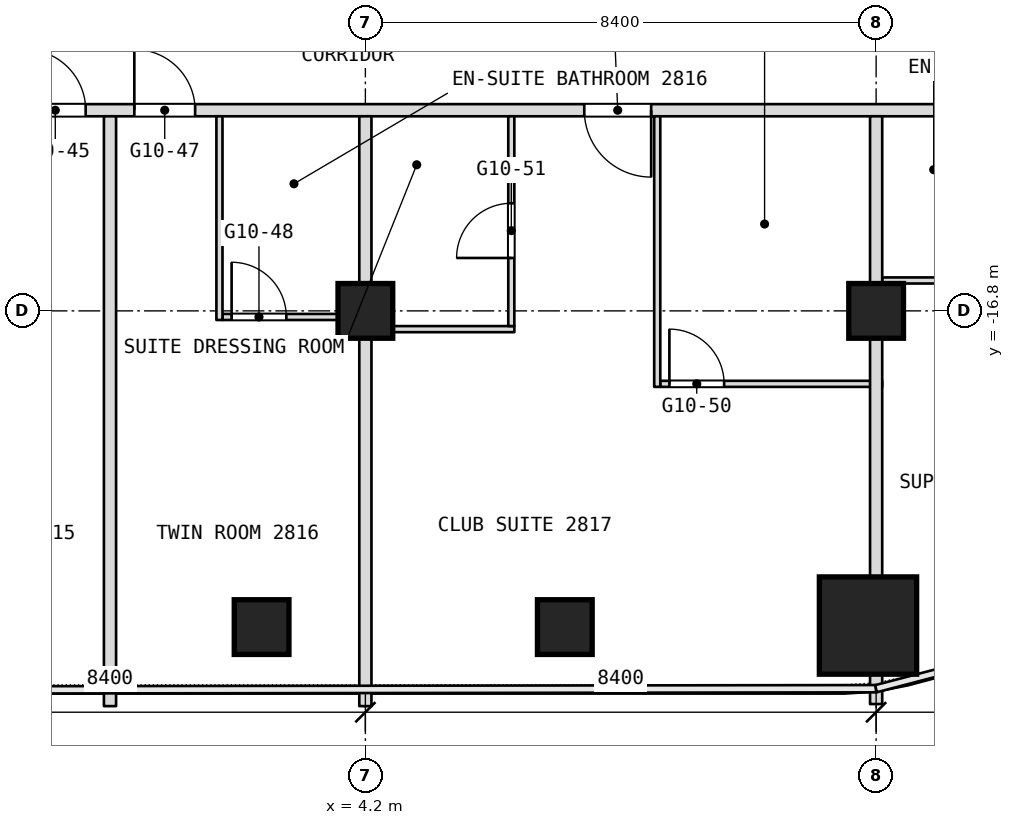
"""IFC4 building model, lengths in metres.
Left out: names, types, materials, properties, quantities, classifications, styles, units other than length and angle.
Written with IfcOpenShell. Run it as: python <this file> out.ifc"""

import sys

from ifc_helpers import new_model, si_unit, direction, frame, frame_2d, origin, origin_2d, place, context, subcontext, project, spatial, rectangle, extrude, element, fill, save


model = new_model("IFC4")
c1 = context("Model", 3, precision=1e-05, world=origin(), true_north=direction((0.0, 1.0)))
c2 = subcontext(c1, "Body", "Model", "MODEL_VIEW")
j1 = project(units=[si_unit("LENGTHUNIT", "METRE"), si_unit("PLANEANGLEUNIT", "RADIAN")], contexts=[c1])
p1 = place(None, origin())
s1 = spatial("IfcSite", under=j1, at=p1, CompositionType="ELEMENT")
p2 = place(p1, origin())
s2 = spatial("IfcBuilding", under=s1, at=p2, CompositionType="ELEMENT")
p3 = place(p2, frame((0.0, 0.0, 126.5)))
s3 = spatial("IfcBuildingStorey", under=s2, at=p3, CompositionType="ELEMENT", Elevation=126.5)
p4 = place(p3, frame((12.466, -21.975, 0.0), z_axis=(0.0, 0.0, 1.0), x_axis=(1.0, 0.0, 0.0)))
e1 = element("IfcColumn", 1, at=p4, inside=s3, PredefinedType="COLUMN", context=c2, shape_type="SweptSolid", body=[
    extrude(rectangle(XDim=1.6, YDim=1.6, at=origin_2d()), origin(), (0.0, 0.0, 1.0), 3.6),
])
for number, where, z_axis, x_axis in (
    (2, (4.2, -16.8, 0.0), (0.0, 0.0, 1.0), (1.0, 0.0, 0.0)),
    (3, (12.6, -16.8, 0.0), (0.0, 0.0, 1.0), (1.0, 0.0, 0.0)),
    (4, (7.48, -22.0, 0.0), (0.0, 0.0, 1.0), (1.0, 0.0, 0.0)),
    (5, (2.493, -22.0, 0.0), (0.0, 0.0, 1.0), (1.0, 0.0, 0.0)),
):
    element("IfcColumn", number, at=place(p3, frame(where, z_axis=z_axis, x_axis=x_axis)), inside=s3, PredefinedType="COLUMN", context=c2, shape_type="SweptSolid", body=[
        extrude(rectangle(XDim=0.9, YDim=0.9, at=origin_2d()), origin(), (0.0, 0.0, 1.0), 3.6),
    ])
p5 = place(p3, frame((9.05, -18.0, 0.0), z_axis=(0.0, 0.0, 1.0), x_axis=(1.0, 0.0, 0.0)))
e6 = element("IfcWall", 6, at=p5, inside=s3, PredefinedType="PARTITIONING", context=c2, shape_type="SweptSolid", body=[
    extrude(rectangle(XDim=3.65, YDim=0.1, at=frame_2d((1.825, 0.0))), origin(), (0.0, 0.0, 1.0), 3.34),
])
p6 = place(p5, frame((0.15, 0.0, 0.0)))
e7 = element("IfcOpeningElement", 7, at=p6, cuts=e6, PredefinedType="OPENING", context=c2, shape_type="SweptSolid", body=[
    extrude(rectangle(XDim=0.9, YDim=2.1, at=frame_2d((0.45, 1.05))), frame((0.0, 0.05, 0.0), z_axis=(0.0, -1.0, 0.0), x_axis=(1.0, 0.0, 0.0)), (0.0, 0.0, 1.0), 0.1),
])
p7 = place(p3, frame((4.3, -17.1, 0.0), z_axis=(0.0, 0.0, 1.0), x_axis=(1.0, 0.0, 0.0)))
e8 = element("IfcWall", 8, at=p7, inside=s3, PredefinedType="PARTITIONING", context=c2, shape_type="SweptSolid", body=[
    extrude(rectangle(XDim=2.35, YDim=0.1, at=frame_2d((1.175, 0.0))), origin(), (0.0, 0.0, 1.0), 3.34),
])
p8 = place(p3, frame((1.85, -16.9, 0.0), z_axis=(0.0, 0.0, 1.0), x_axis=(1.0, 0.0, 0.0)))
e9 = element("IfcWall", 9, at=p8, inside=s3, PredefinedType="PARTITIONING", context=c2, shape_type="SweptSolid", body=[
    extrude(rectangle(XDim=2.45, YDim=0.1, at=frame_2d((1.225, 0.0))), origin(), (0.0, 0.0, 1.0), 2.89),
])
p9 = place(p8, frame((0.15, 0.0, 0.0)))
e10 = element("IfcOpeningElement", 10, at=p9, cuts=e9, PredefinedType="OPENING", context=c2, shape_type="SweptSolid", body=[
    extrude(rectangle(XDim=0.9, YDim=2.1, at=frame_2d((0.45, 1.05))), frame((0.0, 0.05, 0.0), z_axis=(0.0, -1.0, 0.0), x_axis=(1.0, 0.0, 0.0)), (0.0, 0.0, 1.0), 0.1),
])
p10 = place(p3, frame((12.7, -16.3, 0.0), z_axis=(0.0, 0.0, 1.0), x_axis=(1.0, 0.0, 0.0)))
e11 = element("IfcWall", 11, at=p10, inside=s3, PredefinedType="PARTITIONING", context=c2, shape_type="SweptSolid", body=[
    extrude(rectangle(XDim=2.35, YDim=0.1, at=frame_2d((1.175, 0.0))), origin(), (0.0, 0.0, 1.0), 3.34),
])
p11 = place(p10, frame((1.3, 0.0, 0.0)))
e12 = element("IfcOpeningElement", 12, at=p11, cuts=e11, PredefinedType="OPENING", context=c2, shape_type="SweptSolid", body=[
    extrude(rectangle(XDim=0.9, YDim=2.1, at=frame_2d((0.45, 1.05))), frame((0.0, 0.05, 0.0), z_axis=(0.0, -1.0, 0.0), x_axis=(1.0, 0.0, 0.0)), (0.0, 0.0, 1.0), 0.1),
])
p12 = place(p3, frame((-3.2, -13.5, 0.0), z_axis=(0.0, 0.0, 1.0), x_axis=(1.0, 0.0, 0.0)))
e13 = element("IfcWall", 13, at=p12, inside=s3, PredefinedType="PARTITIONING", context=c2, shape_type="SweptSolid", body=[
    extrude(rectangle(XDim=19.9, YDim=0.2, at=frame_2d((9.95, 0.0))), origin(), (0.0, 0.0, 1.0), 3.34),
])
p13 = place(p12, frame((1.8, 0.0, 0.0)))
e14 = element("IfcOpeningElement", 14, at=p13, cuts=e13, PredefinedType="OPENING", context=c2, shape_type="SweptSolid", body=[
    extrude(rectangle(XDim=1.0, YDim=2.1, at=frame_2d((0.5, 1.05))), frame((0.0, 0.1, 0.0), z_axis=(0.0, -1.0, 0.0), x_axis=(1.0, 0.0, 0.0)), (0.0, 0.0, 1.0), 0.2),
])
p14 = place(p12, frame((3.6, 0.0, 0.0)))
e15 = element("IfcOpeningElement", 15, at=p14, cuts=e13, PredefinedType="OPENING", context=c2, shape_type="SweptSolid", body=[
    extrude(rectangle(XDim=1.0, YDim=2.1, at=frame_2d((0.5, 1.05))), frame((0.0, 0.1, 0.0), z_axis=(0.0, -1.0, 0.0), x_axis=(1.0, 0.0, 0.0)), (0.0, 0.0, 1.0), 0.2),
])
p15 = place(p12, frame((11.0, 0.0, 0.0)))
e16 = element("IfcOpeningElement", 16, at=p15, cuts=e13, PredefinedType="OPENING", context=c2, shape_type="SweptSolid", body=[
    extrude(rectangle(XDim=1.1, YDim=2.1, at=frame_2d((0.55, 1.05))), frame((0.0, 0.1, 0.0), z_axis=(0.0, -1.0, 0.0), x_axis=(1.0, 0.0, 0.0)), (0.0, 0.0, 1.0), 0.2),
])
p16 = place(p12, frame((18.6, 0.0, 0.0)))
e17 = element("IfcOpeningElement", 17, at=p16, cuts=e13, PredefinedType="OPENING", context=c2, shape_type="SweptSolid", body=[
    extrude(rectangle(XDim=1.0, YDim=2.1, at=frame_2d((0.5, 1.05))), frame((0.0, 0.1, 0.0), z_axis=(0.0, -1.0, 0.0), x_axis=(1.0, 0.0, 0.0)), (0.0, 0.0, 1.0), 0.2),
])
p17 = place(p3, frame((12.6, -23.266, 0.0), z_axis=(0.0, 0.0, 1.0), x_axis=(0.0, 1.0, 0.0)))
e18 = element("IfcWall", 18, at=p17, inside=s3, PredefinedType="PARTITIONING", context=c2, shape_type="SweptSolid", body=[
    extrude(rectangle(XDim=0.491, YDim=0.2, at=frame_2d((0.246, 0.0))), origin(), (0.0, 0.0, 1.0), 3.34),
])
p18 = place(p3, frame((12.6, -21.175, 0.0), z_axis=(0.0, 0.0, 1.0), x_axis=(0.0, 1.0, 0.0)))
e19 = element("IfcWall", 19, at=p18, inside=s3, PredefinedType="PARTITIONING", context=c2, shape_type="SweptSolid", body=[
    extrude(rectangle(XDim=7.575, YDim=0.2, at=frame_2d((3.788, 0.0))), origin(), (0.0, 0.0, 1.0), 3.34),
])
p19 = place(p3, frame((9.0, -18.05, 0.0), z_axis=(0.0, 0.0, 1.0), x_axis=(0.0, 1.0, 0.0)))
e20 = element("IfcWall", 20, at=p19, inside=s3, PredefinedType="PARTITIONING", context=c2, shape_type="SweptSolid", body=[
    extrude(rectangle(XDim=4.45, YDim=0.1, at=frame_2d((2.225, 0.0))), origin(), (0.0, 0.0, 1.0), 3.34),
])
p20 = place(p3, frame((6.6, -17.05, 0.0), z_axis=(0.0, 0.0, 1.0), x_axis=(0.0, 1.0, 0.0)))
e21 = element("IfcWall", 21, at=p20, inside=s3, PredefinedType="PARTITIONING", context=c2, shape_type="SweptSolid", body=[
    extrude(rectangle(XDim=3.45, YDim=0.1, at=frame_2d((1.725, 0.0))), origin(), (0.0, 0.0, 1.0), 3.34),
])
p21 = place(p20, frame((1.12, 0.0, 0.0)))
e22 = element("IfcOpeningElement", 22, at=p21, cuts=e21, PredefinedType="OPENING", context=c2, shape_type="SweptSolid", body=[
    extrude(rectangle(XDim=0.9, YDim=2.1, at=frame_2d((0.45, 1.05))), frame((0.0, 0.05, 0.0), z_axis=(0.0, -1.0, 0.0), x_axis=(1.0, 0.0, 0.0)), (0.0, 0.0, 1.0), 0.1),
])
p22 = place(p3, frame((4.2, -23.3, 0.0), z_axis=(0.0, 0.0, 1.0), x_axis=(0.0, 1.0, 0.0)))
e23 = element("IfcWall", 23, at=p22, inside=s3, PredefinedType="PARTITIONING", context=c2, shape_type="SweptSolid", body=[
    extrude(rectangle(XDim=9.7, YDim=0.2, at=frame_2d((4.85, 0.0))), origin(), (0.0, 0.0, 1.0), 3.34),
])
p23 = place(p3, frame((1.8, -16.95, 0.0), z_axis=(0.0, 0.0, 1.0), x_axis=(0.0, 1.0, 0.0)))
e24 = element("IfcWall", 24, at=p23, inside=s3, PredefinedType="PARTITIONING", context=c2, shape_type="SweptSolid", body=[
    extrude(rectangle(XDim=3.35, YDim=0.1, at=frame_2d((1.675, 0.0))), origin(), (0.0, 0.0, 1.0), 3.34),
])
p24 = place(p3, frame((0.0, -23.3, 0.0), z_axis=(0.0, 0.0, 1.0), x_axis=(0.0, 1.0, 0.0)))
e25 = element("IfcWall", 25, at=p24, inside=s3, PredefinedType="PARTITIONING", context=c2, shape_type="SweptSolid", body=[
    extrude(rectangle(XDim=9.7, YDim=0.2, at=frame_2d((4.85, 0.0))), origin(), (0.0, 0.0, 1.0), 3.34),
])
p25 = place(p6, origin())
e26 = element("IfcDoor", 26, at=p25, inside=s3, OperationType="SINGLE_SWING_LEFT", PredefinedType="DOOR", context=c2, shape_type="SweptSolid", body=[
    extrude(rectangle(XDim=0.9, YDim=2.1, at=frame_2d((0.45, 1.05))), frame((0.0, 0.025, 0.0), z_axis=(0.0, -1.0, 0.0), x_axis=(1.0, 0.0, 0.0)), (0.0, 0.0, 1.0), 0.05),
])
fill(e7, e26)
p26 = place(p9, origin())
e27 = element("IfcDoor", 27, at=p26, inside=s3, OperationType="SINGLE_SWING_LEFT", PredefinedType="DOOR", context=c2, shape_type="SweptSolid", body=[
    extrude(rectangle(XDim=0.9, YDim=2.1, at=frame_2d((0.45, 1.05))), frame((0.0, 0.025, 0.0), z_axis=(0.0, -1.0, 0.0), x_axis=(1.0, 0.0, 0.0)), (0.0, 0.0, 1.0), 0.05),
])
fill(e10, e27)
p27 = place(p13, origin())
e28 = element("IfcDoor", 28, at=p27, inside=s3, OperationType="SINGLE_SWING_LEFT", PredefinedType="DOOR", context=c2, shape_type="SweptSolid", body=[
    extrude(rectangle(XDim=1.0, YDim=2.1, at=frame_2d((0.5, 1.05))), frame((0.0, 0.025, 0.0), z_axis=(0.0, -1.0, 0.0), x_axis=(1.0, 0.0, 0.0)), (0.0, 0.0, 1.0), 0.05),
])
fill(e14, e28)
p28 = place(p14, origin())
e29 = element("IfcDoor", 29, at=p28, inside=s3, OperationType="SINGLE_SWING_LEFT", PredefinedType="DOOR", context=c2, shape_type="SweptSolid", body=[
    extrude(rectangle(XDim=1.0, YDim=2.1, at=frame_2d((0.5, 1.05))), frame((0.0, 0.025, 0.0), z_axis=(0.0, -1.0, 0.0), x_axis=(1.0, 0.0, 0.0)), (0.0, 0.0, 1.0), 0.05),
])
fill(e15, e29)
p29 = place(p15, origin())
e30 = element("IfcDoor", 30, at=p29, inside=s3, OperationType="SINGLE_SWING_LEFT", PredefinedType="DOOR", context=c2, shape_type="SweptSolid", body=[
    extrude(rectangle(XDim=1.1, YDim=2.1, at=frame_2d((0.55, 1.05))), frame((0.0, 0.025, 0.0), z_axis=(0.0, -1.0, 0.0), x_axis=(1.0, 0.0, 0.0)), (0.0, 0.0, 1.0), 0.05),
])
fill(e16, e30)
p30 = place(p21, origin())
e31 = element("IfcDoor", 31, at=p30, inside=s3, OperationType="SINGLE_SWING_LEFT", PredefinedType="DOOR", context=c2, shape_type="SweptSolid", body=[
    extrude(rectangle(XDim=0.9, YDim=2.1, at=frame_2d((0.45, 1.05))), frame((0.0, 0.025, 0.0), z_axis=(0.0, -1.0, 0.0), x_axis=(1.0, 0.0, 0.0)), (0.0, 0.0, 1.0), 0.05),
])
fill(e22, e31)
save(model, sys.argv[1])
